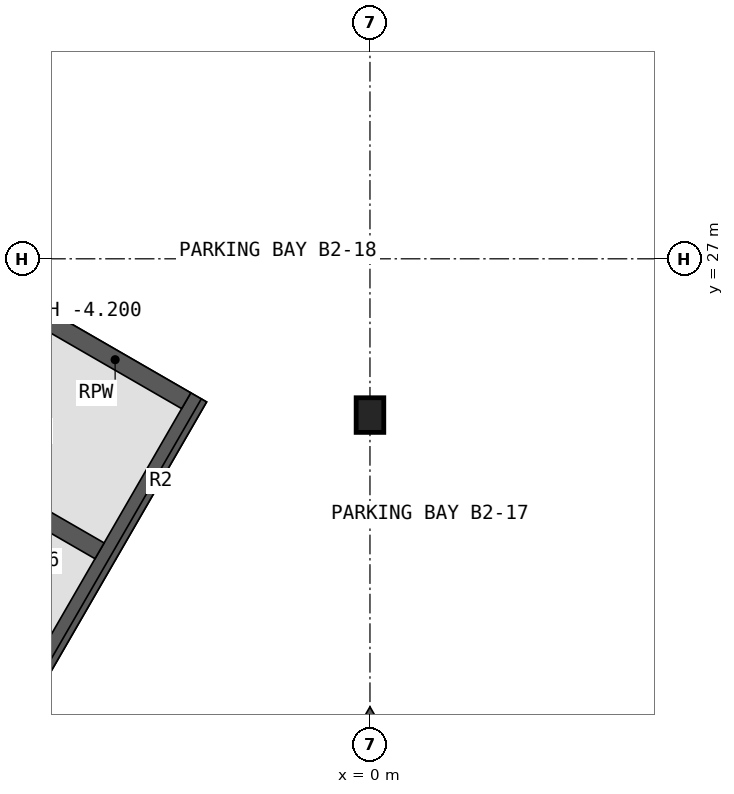
"""IFC4 building model, lengths in metres.
Left out: names, types, materials, properties, quantities, classifications, styles, units other than length and angle.
Written with IfcOpenShell. Run it as: python <this file> out.ifc"""

import sys

from ifc_helpers import new_model, si_unit, direction, frame, frame_2d, origin, origin_2d, place, context, subcontext, project, spatial, polyline, rectangle, i_section, outline, extrude, element, save


model = new_model("IFC4")
c1 = context("Model", 3, precision=1e-05, world=origin(), true_north=direction((0.0, 1.0)))
c2 = subcontext(c1, "Body", "Model", "MODEL_VIEW")
j1 = project(units=[si_unit("LENGTHUNIT", "METRE"), si_unit("PLANEANGLEUNIT", "RADIAN")], contexts=[c1])
p1 = place(None, origin())
s1 = spatial("IfcSite", under=j1, at=p1, CompositionType="ELEMENT")
p2 = place(p1, origin())
s2 = spatial("IfcBuilding", under=s1, at=p2, CompositionType="ELEMENT")
p3 = place(p2, frame((0.0, 0.0, -8.4)))
s3 = spatial("IfcBuildingStorey", under=s2, at=p3, CompositionType="ELEMENT", Elevation=-8.4)
p4 = place(p3, frame((0.0, 24.43, 0.0), z_axis=(0.0, 0.0, 1.0), x_axis=(1.0, 0.0, 0.0)))
e1 = element("IfcColumn", 1, at=p4, inside=s3, PredefinedType="COLUMN", context=c2, shape_type="SweptSolid", body=[
    extrude(i_section(OverallWidth=0.454, OverallDepth=0.57, WebThickness=0.078, FlangeThickness=0.125, at=origin_2d()), origin(), (0.0, 0.0, 1.0), 4.2),
])
p5 = place(p3, origin())
e2 = element("IfcWall", 2, at=p5, inside=s3, PredefinedType="SHEAR", context=c2, shape_type="SweptSolid", body=[
    extrude(outline(polyline([(-0.779, 18.28), (0.0, 19.63), (0.779, 18.28), (0.0, 17.83), (-0.779, 18.28)])), origin(), (0.0, 0.0, 1.0), 3.75),
])
p6 = place(p3, frame((-2.817, 24.72, 0.0), z_axis=(0.0, 0.0, 1.0), x_axis=(-0.500000572924, -0.866025073006, 0.0)))
e3 = element("IfcWall", 3, at=p6, inside=s3, PredefinedType="SHEAR", context=c2, shape_type="SweptSolid", body=[
    extrude(outline(polyline([(0.0, 0.0), (22.467, 0.0), (22.467, 0.3), (3.0, 3.549), (3.0, 3.544), (0.0, 3.799), (0.0, 0.0)])), frame((0.0, 0.15, 0.0), z_axis=(0.0, -1.0, 0.0), x_axis=(1.0, 0.0, 0.0)), (0.0, 0.0, 1.0), 0.3),
])
p7 = place(p3, frame((-4.447, 22.198, 0.0), z_axis=(0.0, 0.0, 1.0), x_axis=(-0.866028230842, 0.499995103361, 0.0)))
e4 = element("IfcWall", 4, at=p7, inside=s3, PredefinedType="SHEAR", context=c2, shape_type="SweptSolid", body=[
    extrude(rectangle(XDim=5.4, YDim=0.3, at=frame_2d((2.7, 0.0))), origin(), (0.0, 0.0, 1.0), 3.544),
])
p8 = place(p3, frame((-3.022, 24.666, 0.0), z_axis=(0.0, 0.0, 1.0), x_axis=(-0.866016927499, 0.50001468107, 0.0)))
e5 = element("IfcWall", 5, at=p8, inside=s3, PredefinedType="SHEAR", context=c2, shape_type="SweptSolid", body=[
    extrude(rectangle(XDim=5.4, YDim=0.3, at=frame_2d((2.7, 0.0))), origin(), (0.0, 0.0, 1.0), 3.799),
])
save(model, sys.argv[1])
